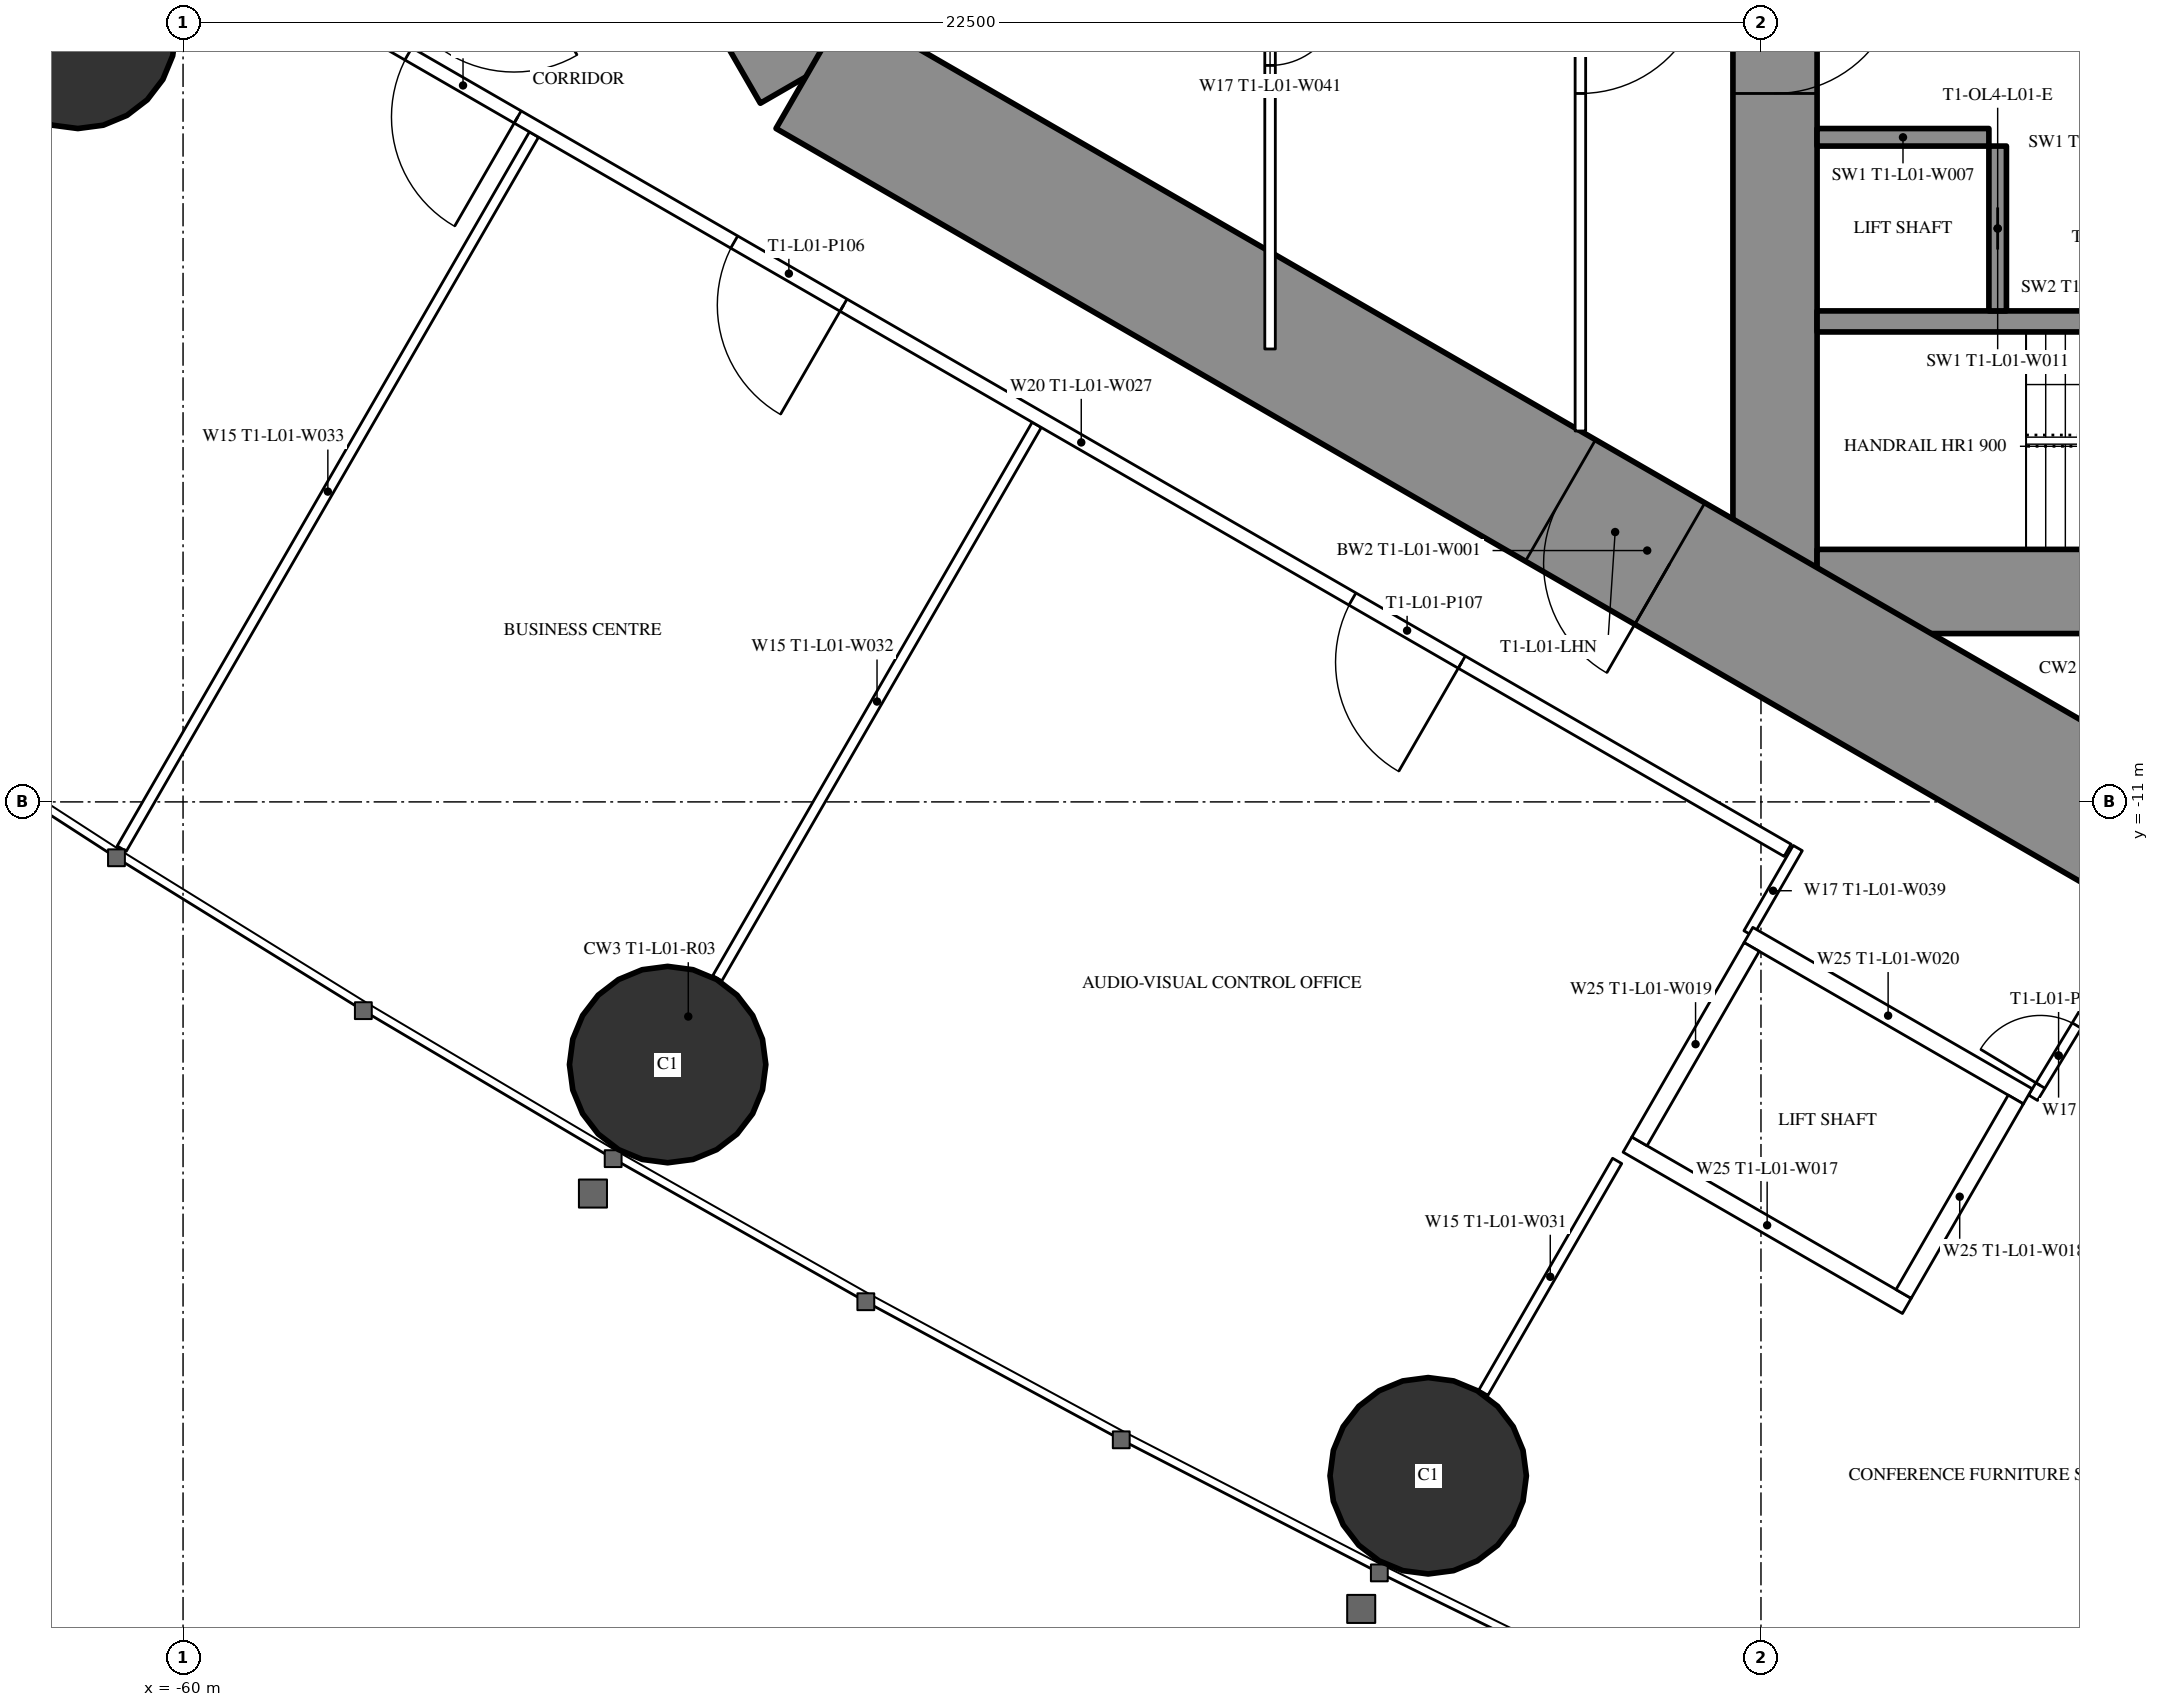
"""IFC4 building model, lengths in metres.
Left out: names, types, materials, properties, quantities, classifications, styles, units other than length and angle.
Written with IfcOpenShell. Run it as: python <this file> out.ifc"""

import sys

from ifc_helpers import new_model, si_unit, direction, frame, frame_2d, origin, origin_2d, place, context, subcontext, project, spatial, rectangle, hollow_circle, extrude, element, fill, save


model = new_model("IFC4")
c1 = context("Model", 3, precision=1e-05, world=origin(), true_north=direction((0.0, 1.0)))
c2 = subcontext(c1, "Body", "Model", "MODEL_VIEW")
j1 = project(units=[si_unit("LENGTHUNIT", "METRE"), si_unit("PLANEANGLEUNIT", "RADIAN")], contexts=[c1])
p1 = place(None, origin())
s1 = spatial("IfcSite", under=j1, at=p1, CompositionType="ELEMENT")
p2 = place(p1, origin())
s2 = spatial("IfcBuilding", under=s1, at=p2, CompositionType="ELEMENT")
p3 = place(p2, frame((0.0, 0.0, 7.2)))
s3 = spatial("IfcBuildingStorey", under=s2, at=p3, CompositionType="ELEMENT", Elevation=7.2)
for number, where, z_axis, x_axis in (
    (1, (-53.09, -14.745, 0.0), (0.0, 0.0, 1.0), (1.0, 0.0, 0.0)),
    (2, (-42.245, -20.607, 0.0), (0.0, 0.0, 1.0), (1.0, 0.0, 0.0)),
):
    element("IfcColumn", number, at=place(p3, frame(where, z_axis=z_axis, x_axis=x_axis)), inside=s3, PredefinedType="COLUMN", context=c2, shape_type="SweptSolid", body=[
        extrude(hollow_circle(Radius=1.4, WallThickness=0.12, at=origin_2d()), origin(), (0.0, 0.0, 1.0), 5.4),
    ])
p4 = place(p3, frame((-61.5, 0.0, 0.0), z_axis=(0.0, 0.0, 1.0), x_axis=(1.0, 0.0, 0.0)))
e3 = element("IfcColumn", 3, at=p4, inside=s3, PredefinedType="COLUMN", context=c2, shape_type="SweptSolid", body=[
    extrude(hollow_circle(Radius=1.4, WallThickness=0.1, at=origin_2d()), origin(), (0.0, 0.0, 1.0), 5.4),
])
p5 = place(p3, frame((-37.3, 8.6, 0.0), z_axis=(0.0, 0.0, 1.0), x_axis=(0.0, -1.0, 0.0)))
e4 = element("IfcWall", 4, at=p5, inside=s3, PredefinedType="SHEAR", context=c2, shape_type="SweptSolid", body=[
    extrude(rectangle(XDim=17.2, YDim=1.2, at=frame_2d((8.6, 0.0))), origin(), (0.0, 0.0, 1.0), 5.4),
])
p6 = place(p5, frame((7.7, 0.0, 0.0)))
e5 = element("IfcOpeningElement", 5, at=p6, cuts=e4, PredefinedType="OPENING", context=c2, shape_type="SweptSolid", body=[
    extrude(rectangle(XDim=1.8, YDim=2.2, at=frame_2d((0.9, 1.1))), frame((0.0, 0.61, 0.0), z_axis=(0.0, -1.0, 0.0), x_axis=(1.0, 0.0, 0.0)), (0.0, 0.0, 1.0), 1.22),
])
p7 = place(p3, frame((-28.3, -8.0, 0.0), z_axis=(0.0, 0.0, 1.0), x_axis=(-1.0, 0.0, 0.0)))
e6 = element("IfcWall", 6, at=p7, inside=s3, PredefinedType="SHEAR", context=c2, shape_type="SweptSolid", body=[
    extrude(rectangle(XDim=8.4, YDim=1.2, at=frame_2d((4.2, 0.0))), origin(), (0.0, 0.0, 1.0), 5.4),
])
p8 = place(p7, frame((0.25, 0.0, 0.0)))
e7 = element("IfcOpeningElement", 7, at=p8, cuts=e6, PredefinedType="OPENING", context=c2, shape_type="SweptSolid", body=[
    extrude(rectangle(XDim=1.0, YDim=2.2, at=frame_2d((0.5, 1.1))), frame((0.0, 0.61, 0.0), z_axis=(0.0, -1.0, 0.0), x_axis=(1.0, 0.0, 0.0)), (0.0, 0.0, 1.0), 1.22),
])
p9 = place(p3, frame((-28.3, -4.15, 0.0), z_axis=(0.0, 0.0, 1.0), x_axis=(-1.0, 0.0, 0.0)))
e8 = element("IfcWall", 8, at=p9, inside=s3, PredefinedType="SHEAR", context=c2, shape_type="SweptSolid", body=[
    extrude(rectangle(XDim=8.4, YDim=0.3, at=frame_2d((4.2, 0.0))), origin(), (0.0, 0.0, 1.0), 5.4),
])
p10 = place(p3, frame((-34.125, -1.65, 0.0), z_axis=(0.0, 0.0, 1.0), x_axis=(0.0, -1.0, 0.0)))
e9 = element("IfcWall", 9, at=p10, inside=s3, PredefinedType="SHEAR", context=c2, shape_type="SweptSolid", body=[
    extrude(rectangle(XDim=2.35, YDim=0.25, at=frame_2d((1.175, 0.0))), origin(), (0.0, 0.0, 1.0), 5.4),
])
p11 = place(p10, frame((0.875, 0.0, 0.0)))
e10 = element("IfcOpeningElement", 10, at=p11, cuts=e9, PredefinedType="OPENING", context=c2, shape_type="SweptSolid", body=[
    extrude(rectangle(XDim=0.6, YDim=2.0, at=frame_2d((0.3, 1.0))), frame((0.0, 0.135, 0.0), z_axis=(0.0, -1.0, 0.0), x_axis=(1.0, 0.0, 0.0)), (0.0, 0.0, 1.0), 0.27),
])
p12 = place(p3, frame((-34.25, -1.525, 0.0), z_axis=(0.0, 0.0, 1.0), x_axis=(-1.0, 0.0, 0.0)))
e11 = element("IfcWall", 11, at=p12, inside=s3, PredefinedType="SHEAR", context=c2, shape_type="SweptSolid", body=[
    extrude(rectangle(XDim=2.45, YDim=0.25, at=frame_2d((1.225, 0.0))), origin(), (0.0, 0.0, 1.0), 5.4),
])
p13 = place(p3, frame((-27.2, 14.3, 0.0), z_axis=(0.0, 0.0, 1.0), x_axis=(-0.866026593062, -0.499997940104, 0.0)))
e12 = element("IfcWall", 12, at=p13, inside=s3, PredefinedType="SHEAR", context=c2, shape_type="SweptSolid", body=[
    extrude(rectangle(XDim=28.946, YDim=2.0, at=frame_2d((14.473, 0.0))), origin(), (0.0, 0.0, 1.0), 5.4),
])
p14 = place(p13, frame((4.6, 0.0, 0.0)))
e13 = element("IfcOpeningElement", 13, at=p14, cuts=e12, PredefinedType="OPENING", context=c2, shape_type="SweptSolid", body=[
    extrude(rectangle(XDim=1.0, YDim=2.2, at=frame_2d((0.5, 1.1))), frame((0.0, 1.01, 0.0), z_axis=(0.0, -1.0, 0.0), x_axis=(1.0, 0.0, 0.0)), (0.0, 0.0, 1.0), 2.02),
])
p15 = place(p13, frame((13.395, 0.0, 0.0)))
e14 = element("IfcOpeningElement", 14, at=p15, cuts=e12, PredefinedType="OPENING", context=c2, shape_type="SweptSolid", body=[
    extrude(rectangle(XDim=1.8, YDim=2.2, at=frame_2d((0.9, 1.1))), frame((0.0, 1.01, 0.0), z_axis=(0.0, -1.0, 0.0), x_axis=(1.0, 0.0, 0.0)), (0.0, 0.0, 1.0), 2.02),
])
p16 = place(p3, frame((-27.2, -14.3, 0.0), z_axis=(0.0, 0.0, 1.0), x_axis=(-0.866024044937, 0.500002353585, 0.0)))
e15 = element("IfcWall", 15, at=p16, inside=s3, PredefinedType="SHEAR", context=c2, shape_type="SweptSolid", body=[
    extrude(rectangle(XDim=27.533, YDim=2.0, at=frame_2d((13.767, 0.0))), origin(), (0.0, 0.0, 1.0), 5.4),
])
p17 = place(p16, frame((4.6, 0.0, 0.0)))
e16 = element("IfcOpeningElement", 16, at=p17, cuts=e15, PredefinedType="OPENING", context=c2, shape_type="SweptSolid", body=[
    extrude(rectangle(XDim=1.0, YDim=2.2, at=frame_2d((0.5, 1.1))), frame((0.0, 1.01, 0.0), z_axis=(0.0, -1.0, 0.0), x_axis=(1.0, 0.0, 0.0)), (0.0, 0.0, 1.0), 2.02),
])
p18 = place(p16, frame((13.395, 0.0, 0.0)))
e17 = element("IfcOpeningElement", 17, at=p18, cuts=e15, PredefinedType="OPENING", context=c2, shape_type="SweptSolid", body=[
    extrude(rectangle(XDim=1.8, YDim=2.2, at=frame_2d((0.9, 1.1))), frame((0.0, 1.01, 0.0), z_axis=(0.0, -1.0, 0.0), x_axis=(1.0, 0.0, 0.0)), (0.0, 0.0, 1.0), 2.02),
])
p19 = place(p3, frame((-47.827, -5.624, 0.0), z_axis=(0.0, 0.0, 1.0), x_axis=(-0.499995404498, -0.866028056982, 0.0)))
e18 = element("IfcWall", 18, at=p19, inside=s3, PredefinedType="PARTITIONING", context=c2, shape_type="SweptSolid", body=[
    extrude(rectangle(XDim=9.11, YDim=0.15, at=frame_2d((4.555, 0.0))), origin(), (0.0, 0.0, 1.0), 4.05),
])
p20 = place(p3, frame((-54.996, -1.485, 0.0), z_axis=(0.0, 0.0, 1.0), x_axis=(-0.500002871521, -0.866023745905, 0.0)))
e19 = element("IfcWall", 19, at=p20, inside=s3, PredefinedType="PARTITIONING", context=c2, shape_type="SweptSolid", body=[
    extrude(rectangle(XDim=11.757, YDim=0.15, at=frame_2d((5.878, 0.0))), origin(), (0.0, 0.0, 1.0), 5.05),
])
p21 = place(p3, frame((-39.551, -16.118, 0.0), z_axis=(0.0, 0.0, 1.0), x_axis=(-0.499986503906, -0.866033195618, 0.0)))
e20 = element("IfcWall", 20, at=p21, inside=s3, PredefinedType="PARTITIONING", context=c2, shape_type="SweptSolid", body=[
    extrude(rectangle(XDim=3.815, YDim=0.15, at=frame_2d((1.907, 0.0))), origin(), (0.0, 0.0, 1.0), 5.05),
])
p22 = place(p3, frame((-27.5, -17.244, 0.0), z_axis=(0.0, 0.0, 1.0), x_axis=(-0.866027347857, 0.499996632752, 0.0)))
e21 = element("IfcWall", 21, at=p22, inside=s3, PredefinedType="PARTITIONING", context=c2, shape_type="SweptSolid", body=[
    extrude(rectangle(XDim=6.269, YDim=0.2, at=frame_2d((3.135, 0.0))), origin(), (0.0, 0.0, 1.0), 5.05),
])
p23 = place(p3, frame((-37.12, -11.69, 0.0), z_axis=(0.0, 0.0, 1.0), x_axis=(-0.866028803602, 0.499994111297, 0.0)))
e22 = element("IfcWall", 22, at=p23, inside=s3, PredefinedType="PARTITIONING", context=c2, shape_type="SweptSolid", body=[
    extrude(rectangle(XDim=23.26, YDim=0.2, at=frame_2d((11.63, 0.0))), origin(), (0.0, 0.0, 1.0), 5.05),
])
p24 = place(p23, frame((20.909, 0.0, 0.0)))
e23 = element("IfcOpeningElement", 23, at=p24, cuts=e22, PredefinedType="OPENING", context=c2, shape_type="SweptSolid", body=[
    extrude(rectangle(XDim=1.8, YDim=2.2, at=frame_2d((0.9, 1.1))), frame((0.0, 0.11, 0.0), z_axis=(0.0, -1.0, 0.0), x_axis=(1.0, 0.0, 0.0)), (0.0, 0.0, 1.0), 0.22),
])
p25 = place(p23, frame((15.544, 0.0, 0.0)))
e24 = element("IfcOpeningElement", 24, at=p25, cuts=e22, PredefinedType="OPENING", context=c2, shape_type="SweptSolid", body=[
    extrude(rectangle(XDim=1.8, YDim=2.2, at=frame_2d((0.9, 1.1))), frame((0.0, 0.11, 0.0), z_axis=(0.0, -1.0, 0.0), x_axis=(1.0, 0.0, 0.0)), (0.0, 0.0, 1.0), 0.22),
])
p26 = place(p23, frame((5.365, 0.0, 0.0)))
e25 = element("IfcOpeningElement", 25, at=p26, cuts=e22, PredefinedType="OPENING", context=c2, shape_type="SweptSolid", body=[
    extrude(rectangle(XDim=1.8, YDim=2.2, at=frame_2d((0.9, 1.1))), frame((0.0, 0.11, 0.0), z_axis=(0.0, -1.0, 0.0), x_axis=(1.0, 0.0, 0.0)), (0.0, 0.0, 1.0), 0.22),
])
p27 = place(p3, frame((-36.976, -11.658, 0.0), z_axis=(0.0, 0.0, 1.0), x_axis=(-0.50008355685, -0.86597715684, 0.0)))
e26 = element("IfcWall", 26, at=p27, inside=s3, PredefinedType="PARTITIONING", context=c2, shape_type="SweptSolid", body=[
    extrude(rectangle(XDim=1.405, YDim=0.15, at=frame_2d((0.702, 0.0))), origin(), (0.0, 0.0, 1.0), 5.05),
])
p28 = place(p3, frame((-33.621, -15.218, 0.0), z_axis=(0.0, 0.0, 1.0), x_axis=(0.518424923641, 0.855123148177, 0.0)))
e27 = element("IfcWall", 27, at=p28, inside=s3, PredefinedType="PARTITIONING", context=c2, shape_type="SweptSolid", body=[
    extrude(rectangle(XDim=1.405, YDim=0.15, at=frame_2d((0.703, 0.0))), origin(), (0.0, 0.0, 1.0), 5.05),
])
p29 = place(p28, frame((0.203, 0.0, 0.0)))
e28 = element("IfcOpeningElement", 28, at=p29, cuts=e27, PredefinedType="OPENING", context=c2, shape_type="SweptSolid", body=[
    extrude(rectangle(XDim=1.0, YDim=2.2, at=frame_2d((0.5, 1.1))), frame((0.0, 0.085, 0.0), z_axis=(0.0, -1.0, 0.0), x_axis=(1.0, 0.0, 0.0)), (0.0, 0.0, 1.0), 0.17),
])
p30 = place(p3, frame((-40.075, 5.712, 0.0), z_axis=(0.0, 0.0, 1.0), x_axis=(0.0, -1.0, 0.0)))
e29 = element("IfcWall", 29, at=p30, inside=s3, PredefinedType="PARTITIONING", context=c2, shape_type="SweptSolid", body=[
    extrude(rectangle(XDim=11.424, YDim=0.15, at=frame_2d((5.712, 0.0))), origin(), (0.0, 0.0, 1.0), 5.05),
])
p31 = place(p30, frame((4.812, 0.0, 0.0)))
e30 = element("IfcOpeningElement", 30, at=p31, cuts=e29, PredefinedType="OPENING", context=c2, shape_type="SweptSolid", body=[
    extrude(rectangle(XDim=1.8, YDim=2.2, at=frame_2d((0.9, 1.1))), frame((0.0, 0.085, 0.0), z_axis=(0.0, -1.0, 0.0), x_axis=(1.0, 0.0, 0.0)), (0.0, 0.0, 1.0), 0.17),
])
p32 = place(p3, frame((-44.5, 4.543, 0.0), z_axis=(0.0, 0.0, 1.0), x_axis=(0.0, -1.0, 0.0)))
e31 = element("IfcWall", 31, at=p32, inside=s3, PredefinedType="PARTITIONING", context=c2, shape_type="SweptSolid", body=[
    extrude(rectangle(XDim=9.085, YDim=0.15, at=frame_2d((4.543, 0.0))), origin(), (0.0, 0.0, 1.0), 5.05),
])
p33 = place(p32, frame((4.043, 0.0, 0.0)))
e32 = element("IfcOpeningElement", 32, at=p33, cuts=e31, PredefinedType="OPENING", context=c2, shape_type="SweptSolid", body=[
    extrude(rectangle(XDim=1.0, YDim=2.2, at=frame_2d((0.5, 1.1))), frame((0.0, 0.085, 0.0), z_axis=(0.0, -1.0, 0.0), x_axis=(1.0, 0.0, 0.0)), (0.0, 0.0, 1.0), 0.17),
])
p34 = place(p3, frame((-33.696, -15.197, 0.0), z_axis=(0.0, 0.0, 1.0), x_axis=(-0.865976953817, 0.500083908417, 0.0)))
e33 = element("IfcWall", 33, at=p34, inside=s3, PredefinedType="PARTITIONING", context=c2, shape_type="SweptSolid", body=[
    extrude(rectangle(XDim=4.599, YDim=0.25, at=frame_2d((2.3, 0.0))), origin(), (0.0, 0.0, 1.0), 5.05),
])
p35 = place(p3, frame((-35.42, -18.186, 0.0), z_axis=(0.0, 0.0, 1.0), x_axis=(-0.865990227814, 0.50006092162, 0.0)))
e34 = element("IfcWall", 34, at=p35, inside=s3, PredefinedType="PARTITIONING", context=c2, shape_type="SweptSolid", body=[
    extrude(rectangle(XDim=4.6, YDim=0.25, at=frame_2d((2.3, 0.0))), origin(), (0.0, 0.0, 1.0), 5.05),
])
p36 = place(p3, frame((-33.866, -15.243, 0.0), z_axis=(0.0, 0.0, 1.0), x_axis=(-0.499929347863, -0.866066190972, 0.0)))
e35 = element("IfcWall", 35, at=p36, inside=s3, PredefinedType="PARTITIONING", context=c2, shape_type="SweptSolid", body=[
    extrude(rectangle(XDim=3.201, YDim=0.25, at=frame_2d((1.6, 0.0))), origin(), (0.0, 0.0, 1.0), 5.05),
])
p37 = place(p3, frame((-37.633, -13.068, 0.0), z_axis=(0.0, 0.0, 1.0), x_axis=(-0.499872130319, -0.866099216793, 0.0)))
e36 = element("IfcWall", 36, at=p37, inside=s3, PredefinedType="PARTITIONING", context=c2, shape_type="SweptSolid", body=[
    extrude(rectangle(XDim=3.2, YDim=0.25, at=frame_2d((1.6, 0.0))), origin(), (0.0, 0.0, 1.0), 5.05),
])
p38 = place(p24, origin())
e37 = element("IfcDoor", 37, at=p38, inside=s3, OperationType="DOUBLE_DOOR_SINGLE_SWING", PredefinedType="DOOR", context=c2, shape_type="SweptSolid", body=[
    extrude(rectangle(XDim=1.8, YDim=2.2, at=frame_2d((0.9, 1.1))), frame((0.0, 0.025, 0.0), z_axis=(0.0, -1.0, 0.0), x_axis=(1.0, 0.0, 0.0)), (0.0, 0.0, 1.0), 0.05),
])
fill(e23, e37)
p39 = place(p25, origin())
e38 = element("IfcDoor", 38, at=p39, inside=s3, OperationType="DOUBLE_DOOR_SINGLE_SWING", PredefinedType="DOOR", context=c2, shape_type="SweptSolid", body=[
    extrude(rectangle(XDim=1.8, YDim=2.2, at=frame_2d((0.9, 1.1))), frame((0.0, 0.025, 0.0), z_axis=(0.0, -1.0, 0.0), x_axis=(1.0, 0.0, 0.0)), (0.0, 0.0, 1.0), 0.05),
])
fill(e24, e38)
p40 = place(p26, origin())
e39 = element("IfcDoor", 39, at=p40, inside=s3, OperationType="DOUBLE_DOOR_SINGLE_SWING", PredefinedType="DOOR", context=c2, shape_type="SweptSolid", body=[
    extrude(rectangle(XDim=1.8, YDim=2.2, at=frame_2d((0.9, 1.1))), frame((0.0, 0.025, 0.0), z_axis=(0.0, -1.0, 0.0), x_axis=(1.0, 0.0, 0.0)), (0.0, 0.0, 1.0), 0.05),
])
fill(e25, e39)
p41 = place(p29, origin())
e40 = element("IfcDoor", 40, at=p41, inside=s3, OperationType="SINGLE_SWING_LEFT", PredefinedType="DOOR", context=c2, shape_type="SweptSolid", body=[
    extrude(rectangle(XDim=1.0, YDim=2.2, at=frame_2d((0.5, 1.1))), frame((0.0, 0.025, 0.0), z_axis=(0.0, -1.0, 0.0), x_axis=(1.0, 0.0, 0.0)), (0.0, 0.0, 1.0), 0.05),
])
fill(e28, e40)
p42 = place(p31, origin())
e41 = element("IfcDoor", 41, at=p42, inside=s3, OperationType="DOUBLE_DOOR_SINGLE_SWING", PredefinedType="DOOR", context=c2, shape_type="SweptSolid", body=[
    extrude(rectangle(XDim=1.8, YDim=2.2, at=frame_2d((0.9, 1.1))), frame((0.0, 0.025, 0.0), z_axis=(0.0, -1.0, 0.0), x_axis=(1.0, 0.0, 0.0)), (0.0, 0.0, 1.0), 0.05),
])
fill(e30, e41)
p43 = place(p33, origin())
e42 = element("IfcDoor", 42, at=p43, inside=s3, OperationType="SINGLE_SWING_LEFT", PredefinedType="DOOR", context=c2, shape_type="SweptSolid", body=[
    extrude(rectangle(XDim=1.0, YDim=2.2, at=frame_2d((0.5, 1.1))), frame((0.0, 0.025, 0.0), z_axis=(0.0, -1.0, 0.0), x_axis=(1.0, 0.0, 0.0)), (0.0, 0.0, 1.0), 0.05),
])
fill(e32, e42)
p44 = place(p18, origin())
e43 = element("IfcDoor", 43, at=p44, inside=s3, OperationType="DOUBLE_DOOR_SINGLE_SWING", PredefinedType="DOOR", context=c2, shape_type="SweptSolid", body=[
    extrude(rectangle(XDim=1.8, YDim=2.2, at=frame_2d((0.9, 1.1))), frame((0.0, 0.025, 0.0), z_axis=(0.0, -1.0, 0.0), x_axis=(1.0, 0.0, 0.0)), (0.0, 0.0, 1.0), 0.05),
])
fill(e17, e43)
p45 = place(p6, origin())
e44 = element("IfcDoor", 44, at=p45, inside=s3, OperationType="DOUBLE_DOOR_SINGLE_SWING", PredefinedType="DOOR", context=c2, shape_type="SweptSolid", body=[
    extrude(rectangle(XDim=1.8, YDim=2.2, at=frame_2d((0.9, 1.1))), frame((0.0, 0.025, 0.0), z_axis=(0.0, -1.0, 0.0), x_axis=(1.0, 0.0, 0.0)), (0.0, 0.0, 1.0), 0.05),
])
fill(e5, e44)
p46 = place(p11, origin())
e45 = element("IfcDoor", 45, at=p46, inside=s3, OperationType="SLIDING_TO_LEFT", PredefinedType="DOOR", context=c2, shape_type="SweptSolid", body=[
    extrude(rectangle(XDim=0.6, YDim=2.0, at=frame_2d((0.3, 1.0))), frame((0.0, 0.025, 0.0), z_axis=(0.0, -1.0, 0.0), x_axis=(1.0, 0.0, 0.0)), (0.0, 0.0, 1.0), 0.05),
])
fill(e10, e45)
save(model, sys.argv[1])
